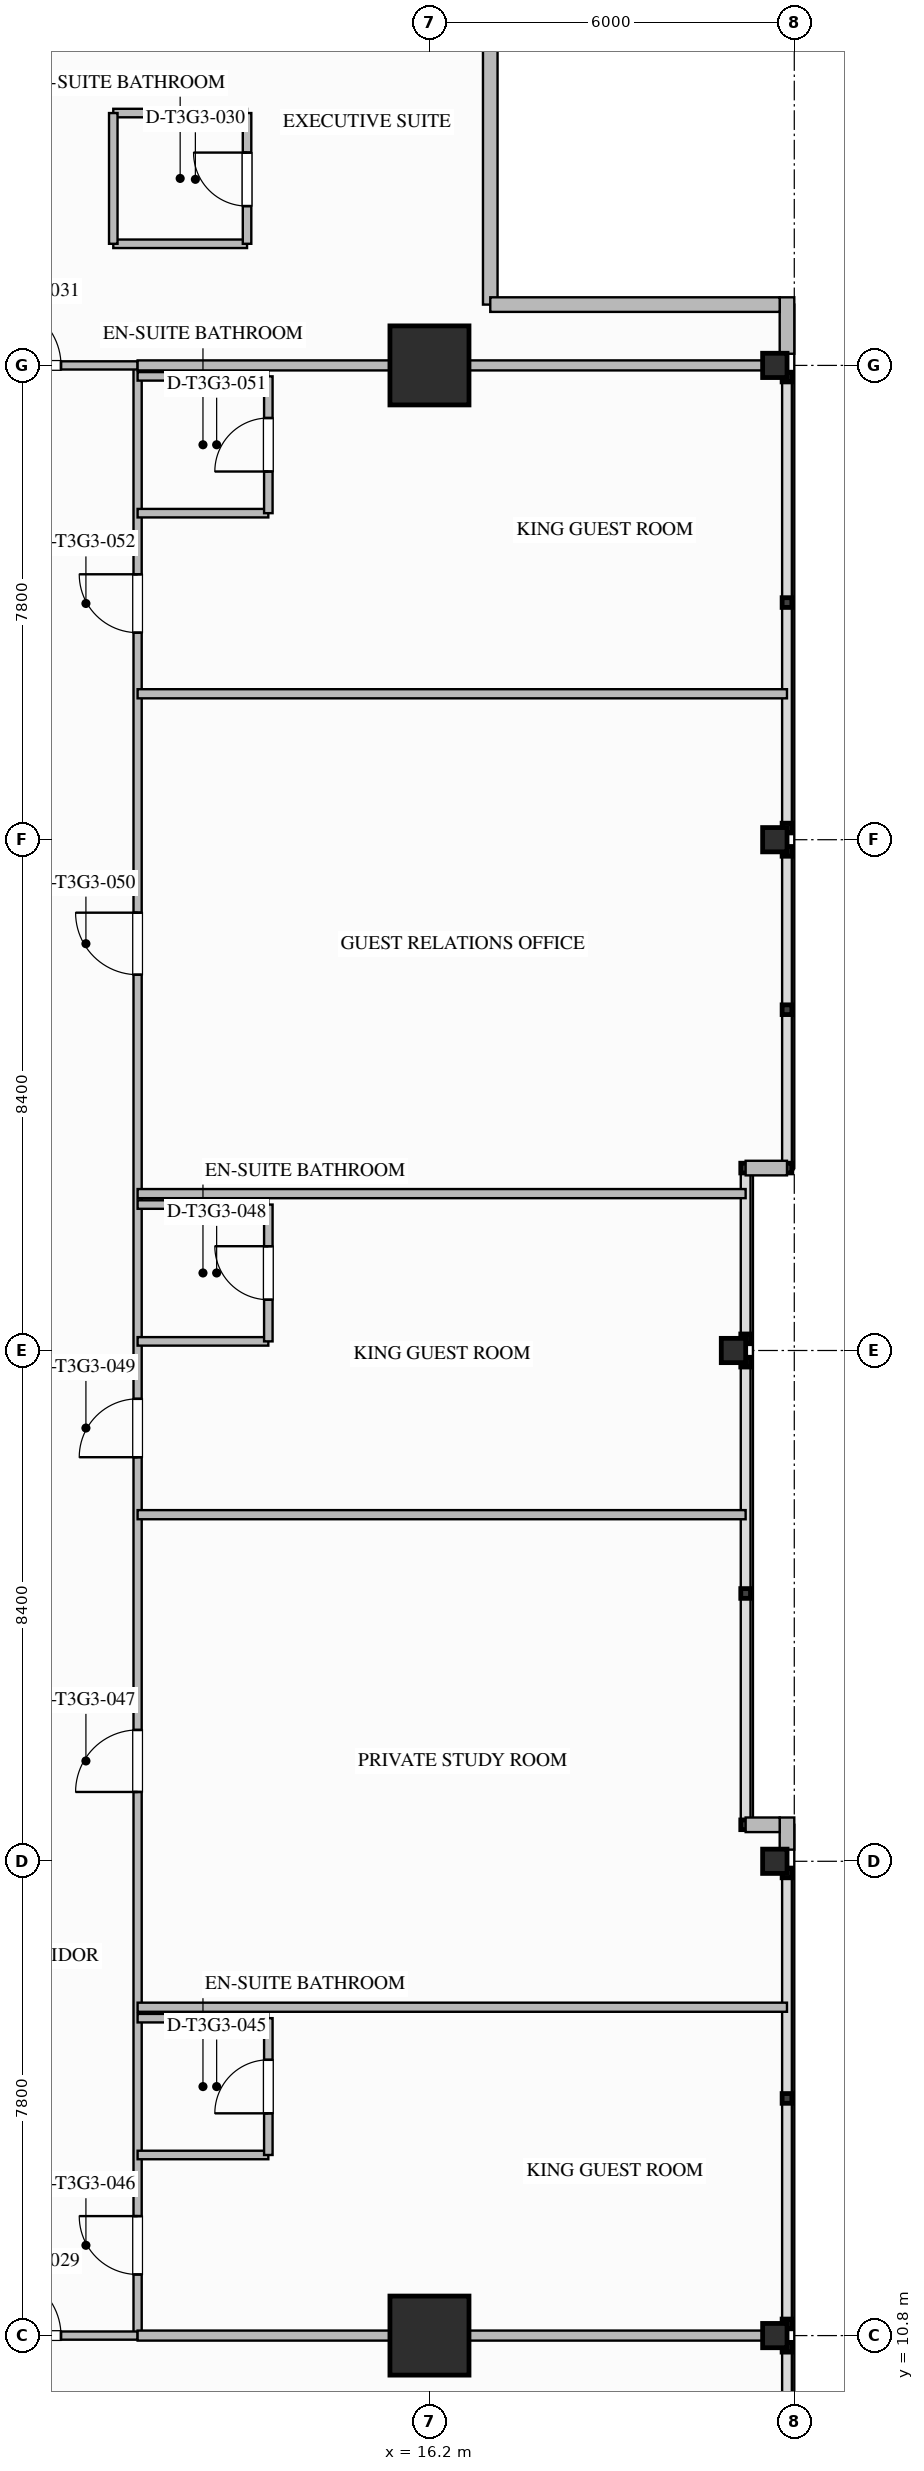
"""IFC4 building model, lengths in metres.
Left out: names, types, materials, properties, quantities, classifications, styles, units other than length and angle.
Written with IfcOpenShell. Run it as: python <this file> out.ifc"""

import sys

from ifc_helpers import new_model, si_unit, direction, frame, frame_2d, origin, origin_2d, place, context, subcontext, project, spatial, rectangle, i_section, extrude, element, fill, save


model = new_model("IFC4")
c1 = context("Model", 3, precision=1e-05, world=origin(), true_north=direction((0.0, 1.0)))
c2 = subcontext(c1, "Body", "Model", "MODEL_VIEW")
j1 = project(units=[si_unit("LENGTHUNIT", "METRE"), si_unit("PLANEANGLEUNIT", "RADIAN")], contexts=[c1])
p1 = place(None, origin())
s1 = spatial("IfcSite", under=j1, at=p1, CompositionType="ELEMENT")
p2 = place(p1, origin())
s2 = spatial("IfcBuilding", under=s1, at=p2, CompositionType="ELEMENT")
p3 = place(p2, frame((0.0, 0.0, 178.8)))
s3 = spatial("IfcBuildingStorey", under=s2, at=p3, CompositionType="ELEMENT", Elevation=178.8)
for number, where, z_axis, x_axis in (
    (1, (16.2, 10.8, 0.0), (0.0, 0.0, 1.0), (1.0, 0.0, 0.0)),
    (2, (16.2, 43.2, 0.0), (0.0, 0.0, 1.0), (1.0, 0.0, 0.0)),
):
    element("IfcColumn", number, at=place(p3, frame(where, z_axis=z_axis, x_axis=x_axis)), inside=s3, PredefinedType="COLUMN", context=c2, shape_type="SweptSolid", body=[
        extrude(rectangle(XDim=1.3, YDim=1.3, at=origin_2d()), origin(), (0.0, 0.0, 1.0), 3.55),
    ])
for number, where, z_axis, x_axis in (
    (3, (21.88, 10.8, 0.0), (0.0, 0.0, 1.0), (1.0, 0.0, 0.0)),
    (4, (21.88, 18.6, 0.0), (0.0, 0.0, 1.0), (1.0, 0.0, 0.0)),
    (5, (21.2, 27.0, 0.0), (0.0, 0.0, 1.0), (1.0, 0.0, 0.0)),
    (6, (21.88, 35.4, 0.0), (0.0, 0.0, 1.0), (1.0, 0.0, 0.0)),
    (7, (21.88, 43.2, 0.0), (0.0, 0.0, 1.0), (1.0, 0.0, 0.0)),
):
    element("IfcColumn", number, at=place(p3, frame(where, z_axis=z_axis, x_axis=x_axis)), inside=s3, PredefinedType="COLUMN", context=c2, shape_type="SweptSolid", body=[
        extrude(i_section(OverallWidth=0.401, OverallDepth=0.399, WebThickness=0.025, FlangeThickness=0.04, FilletRadius=0.025, at=origin_2d()), origin(), (0.0, 0.0, 1.0), 3.547),
    ])
p4 = place(p3, frame((22.08, 44.32, 0.0), z_axis=(0.0, 0.0, 1.0), x_axis=(0.0, -1.0, 0.0)))
e8 = element("IfcWall", 8, at=p4, inside=s3, PredefinedType="STANDARD", context=c2, shape_type="SweptSolid", body=[
    extrude(rectangle(XDim=0.928, YDim=0.24, at=frame_2d((0.464, 0.0))), origin(), (0.0, 0.0, 1.0), 3.29),
])
p5 = place(p3, frame((22.08, 19.32, 0.0), z_axis=(0.0, 0.0, 1.0), x_axis=(0.0, -1.0, 0.0)))
e9 = element("IfcWall", 9, at=p5, inside=s3, PredefinedType="STANDARD", context=c2, shape_type="SweptSolid", body=[
    extrude(rectangle(XDim=0.528, YDim=0.24, at=frame_2d((0.264, 0.0))), origin(), (0.0, 0.0, 1.0), 3.29),
])
for number, where, z_axis, x_axis in (
    (10, (17.2, 48.96, 0.0), (0.0, 0.0, 1.0), (0.0, -1.0, 0.0)),
    (11, (17.2, 44.2, 0.0), (0.0, 0.0, 1.0), (1.0, 0.0, 0.0)),
):
    element("IfcWall", number, at=place(p3, frame(where, z_axis=z_axis, x_axis=x_axis)), inside=s3, PredefinedType="STANDARD", context=c2, shape_type="SweptSolid", body=[
        extrude(rectangle(XDim=4.76, YDim=0.24, at=frame_2d((2.38, 0.0))), origin(), (0.0, 0.0, 1.0), 3.29),
    ])
p6 = place(p3, frame((22.08, 30.0, 0.0), z_axis=(0.0, 0.0, 1.0), x_axis=(-1.0, 0.0, 0.0)))
e12 = element("IfcWall", 12, at=p6, inside=s3, PredefinedType="STANDARD", context=c2, shape_type="SweptSolid", body=[
    extrude(rectangle(XDim=0.68, YDim=0.24, at=frame_2d((0.34, 0.0))), origin(), (0.0, 0.0, 1.0), 3.29),
])
p7 = place(p3, frame((21.4, 19.2, 0.0), z_axis=(0.0, 0.0, 1.0), x_axis=(1.0, 0.0, 0.0)))
e13 = element("IfcWall", 13, at=p7, inside=s3, PredefinedType="STANDARD", context=c2, shape_type="SweptSolid", body=[
    extrude(rectangle(XDim=0.56, YDim=0.24, at=frame_2d((0.28, 0.0))), origin(), (0.0, 0.0, 1.0), 3.29),
])
p8 = place(p3, frame((11.4, 10.8, 0.0), z_axis=(0.0, 0.0, 1.0), x_axis=(0.0, 1.0, 0.0)))
e14 = element("IfcWall", 14, at=p8, inside=s3, PredefinedType="PARTITIONING", context=c2, shape_type="SweptSolid", body=[
    extrude(rectangle(XDim=32.4, YDim=0.135, at=frame_2d((16.2, 0.0))), origin(), (0.0, 0.0, 1.0), 3.29),
])
p9 = place(p8, frame((1.005, 0.0, 0.0)))
e15 = element("IfcOpeningElement", 15, at=p9, cuts=e14, PredefinedType="OPENING", context=c2, shape_type="SweptSolid", body=[
    extrude(rectangle(XDim=0.96, YDim=2.15, at=frame_2d((0.48, 1.075))), frame((0.0, 0.077, 0.0), z_axis=(0.0, -1.0, 0.0), x_axis=(1.0, 0.0, 0.0)), (0.0, 0.0, 1.0), 0.155),
])
p10 = place(p8, frame((8.94, 0.0, 0.0)))
e16 = element("IfcOpeningElement", 16, at=p10, cuts=e14, PredefinedType="OPENING", context=c2, shape_type="SweptSolid", body=[
    extrude(rectangle(XDim=1.02, YDim=2.15, at=frame_2d((0.51, 1.075))), frame((0.0, 0.077, 0.0), z_axis=(0.0, -1.0, 0.0), x_axis=(1.0, 0.0, 0.0)), (0.0, 0.0, 1.0), 0.155),
])
p11 = place(p8, frame((14.445, 0.0, 0.0)))
e17 = element("IfcOpeningElement", 17, at=p11, cuts=e14, PredefinedType="OPENING", context=c2, shape_type="SweptSolid", body=[
    extrude(rectangle(XDim=0.96, YDim=2.15, at=frame_2d((0.48, 1.075))), frame((0.0, 0.077, 0.0), z_axis=(0.0, -1.0, 0.0), x_axis=(1.0, 0.0, 0.0)), (0.0, 0.0, 1.0), 0.155),
])
p12 = place(p8, frame((22.38, 0.0, 0.0)))
e18 = element("IfcOpeningElement", 18, at=p12, cuts=e14, PredefinedType="OPENING", context=c2, shape_type="SweptSolid", body=[
    extrude(rectangle(XDim=1.02, YDim=2.15, at=frame_2d((0.51, 1.075))), frame((0.0, 0.077, 0.0), z_axis=(0.0, -1.0, 0.0), x_axis=(1.0, 0.0, 0.0)), (0.0, 0.0, 1.0), 0.155),
])
p13 = place(p8, frame((28.005, 0.0, 0.0)))
e19 = element("IfcOpeningElement", 19, at=p13, cuts=e14, PredefinedType="OPENING", context=c2, shape_type="SweptSolid", body=[
    extrude(rectangle(XDim=0.96, YDim=2.15, at=frame_2d((0.48, 1.075))), frame((0.0, 0.077, 0.0), z_axis=(0.0, -1.0, 0.0), x_axis=(1.0, 0.0, 0.0)), (0.0, 0.0, 1.0), 0.155),
])
p14 = place(p3, frame((8.6, 10.8, 0.0), z_axis=(0.0, 0.0, 1.0), x_axis=(1.0, 0.0, 0.0)))
e20 = element("IfcWall", 20, at=p14, inside=s3, PredefinedType="PARTITIONING", context=c2, shape_type="SweptSolid", body=[
    extrude(rectangle(XDim=2.8, YDim=0.135, at=frame_2d((1.4, 0.0))), origin(), (0.0, 0.0, 1.0), 2.58),
])
p15 = place(p14, frame((0.52, 0.0, 0.0)))
e21 = element("IfcOpeningElement", 21, at=p15, cuts=e20, PredefinedType="OPENING", context=c2, shape_type="SweptSolid", body=[
    extrude(rectangle(XDim=1.02, YDim=2.15, at=frame_2d((0.51, 1.075))), frame((0.0, 0.077, 0.0), z_axis=(0.0, -1.0, 0.0), x_axis=(1.0, 0.0, 0.0)), (0.0, 0.0, 1.0), 0.155),
])
p16 = place(p3, frame((8.6, 43.2, 0.0), z_axis=(0.0, 0.0, 1.0), x_axis=(1.0, 0.0, 0.0)))
e22 = element("IfcWall", 22, at=p16, inside=s3, PredefinedType="PARTITIONING", context=c2, shape_type="SweptSolid", body=[
    extrude(rectangle(XDim=2.8, YDim=0.135, at=frame_2d((1.4, 0.0))), origin(), (0.0, 0.0, 1.0), 2.58),
])
p17 = place(p16, frame((0.52, 0.0, 0.0)))
e23 = element("IfcOpeningElement", 23, at=p17, cuts=e22, PredefinedType="OPENING", context=c2, shape_type="SweptSolid", body=[
    extrude(rectangle(XDim=1.02, YDim=2.15, at=frame_2d((0.51, 1.075))), frame((0.0, 0.077, 0.0), z_axis=(0.0, -1.0, 0.0), x_axis=(1.0, 0.0, 0.0)), (0.0, 0.0, 1.0), 0.155),
])
for number, where, z_axis, x_axis in (
    (24, (11.4, 10.8, 0.0), (0.0, 0.0, 1.0), (1.0, 0.0, 0.0)),
    (25, (11.4, 43.2, 0.0), (0.0, 0.0, 1.0), (1.0, 0.0, 0.0)),
):
    element("IfcWall", number, at=place(p3, frame(where, z_axis=z_axis, x_axis=x_axis)), inside=s3, PredefinedType="PARTITIONING", context=c2, shape_type="SweptSolid", body=[
        extrude(rectangle(XDim=10.68, YDim=0.165, at=frame_2d((5.34, 0.0))), origin(), (0.0, 0.0, 1.0), 2.58),
    ])
for number, where, z_axis, x_axis in (
    (26, (11.0, 45.2, 0.0), (0.0, 0.0, 1.0), (1.0, 0.0, 0.0)),
    (27, (11.0, 47.35, 0.0), (0.0, 0.0, 1.0), (1.0, 0.0, 0.0)),
):
    element("IfcWall", number, at=place(p3, frame(where, z_axis=z_axis, x_axis=x_axis)), inside=s3, PredefinedType="PLUMBINGWALL", context=c2, shape_type="SweptSolid", body=[
        extrude(rectangle(XDim=2.2, YDim=0.14, at=frame_2d((1.1, 0.0))), origin(), (0.0, 0.0, 1.0), 3.29),
    ])
p18 = place(p3, frame((11.0, 45.2, 0.0), z_axis=(0.0, 0.0, 1.0), x_axis=(0.0, 1.0, 0.0)))
e28 = element("IfcWall", 28, at=p18, inside=s3, PredefinedType="PLUMBINGWALL", context=c2, shape_type="SweptSolid", body=[
    extrude(rectangle(XDim=2.15, YDim=0.14, at=frame_2d((1.075, 0.0))), origin(), (0.0, 0.0, 1.0), 3.29),
])
p19 = place(p3, frame((13.2, 45.2, 0.0), z_axis=(0.0, 0.0, 1.0), x_axis=(0.0, 1.0, 0.0)))
e29 = element("IfcWall", 29, at=p19, inside=s3, PredefinedType="PLUMBINGWALL", context=c2, shape_type="SweptSolid", body=[
    extrude(rectangle(XDim=2.15, YDim=0.14, at=frame_2d((1.075, 0.0))), origin(), (0.0, 0.0, 1.0), 3.29),
])
p20 = place(p19, frame((0.62, 0.0, 0.0)))
e30 = element("IfcOpeningElement", 30, at=p20, cuts=e29, PredefinedType="OPENING", context=c2, shape_type="SweptSolid", body=[
    extrude(rectangle(XDim=0.88, YDim=2.1, at=frame_2d((0.44, 1.05))), frame((0.0, 0.08, 0.0), z_axis=(0.0, -1.0, 0.0), x_axis=(1.0, 0.0, 0.0)), (0.0, 0.0, 1.0), 0.16),
])
for number, where, z_axis, x_axis in (
    (31, (11.4, 13.77, 0.0), (0.0, 0.0, 1.0), (1.0, 0.0, 0.0)),
    (32, (11.4, 16.02, 0.0), (0.0, 0.0, 1.0), (1.0, 0.0, 0.0)),
):
    element("IfcWall", number, at=place(p3, frame(where, z_axis=z_axis, x_axis=x_axis)), inside=s3, PredefinedType="PLUMBINGWALL", context=c2, shape_type="SweptSolid", body=[
        extrude(rectangle(XDim=2.15, YDim=0.14, at=frame_2d((1.075, 0.0))), origin(), (0.0, 0.0, 1.0), 3.29),
    ])
p21 = place(p3, frame((13.55, 13.77, 0.0), z_axis=(0.0, 0.0, 1.0), x_axis=(0.0, 1.0, 0.0)))
e33 = element("IfcWall", 33, at=p21, inside=s3, PredefinedType="PLUMBINGWALL", context=c2, shape_type="SweptSolid", body=[
    extrude(rectangle(XDim=2.25, YDim=0.14, at=frame_2d((1.125, 0.0))), origin(), (0.0, 0.0, 1.0), 3.29),
])
p22 = place(p21, frame((0.685, 0.0, 0.0)))
e34 = element("IfcOpeningElement", 34, at=p22, cuts=e33, PredefinedType="OPENING", context=c2, shape_type="SweptSolid", body=[
    extrude(rectangle(XDim=0.88, YDim=2.1, at=frame_2d((0.44, 1.05))), frame((0.0, 0.08, 0.0), z_axis=(0.0, -1.0, 0.0), x_axis=(1.0, 0.0, 0.0)), (0.0, 0.0, 1.0), 0.16),
])
p23 = place(p3, frame((11.4, 16.2, 0.0), z_axis=(0.0, 0.0, 1.0), x_axis=(1.0, 0.0, 0.0)))
e35 = element("IfcWall", 35, at=p23, inside=s3, PredefinedType="PARTITIONING", context=c2, shape_type="SweptSolid", body=[
    extrude(rectangle(XDim=10.68, YDim=0.15, at=frame_2d((5.34, 0.0))), origin(), (0.0, 0.0, 1.0), 3.29),
])
p24 = place(p3, frame((11.4, 24.3, 0.0), z_axis=(0.0, 0.0, 1.0), x_axis=(1.0, 0.0, 0.0)))
e36 = element("IfcWall", 36, at=p24, inside=s3, PredefinedType="PARTITIONING", context=c2, shape_type="SweptSolid", body=[
    extrude(rectangle(XDim=10.0, YDim=0.15, at=frame_2d((5.0, 0.0))), origin(), (0.0, 0.0, 1.0), 3.29),
])
p25 = place(p3, frame((11.4, 27.15, 0.0), z_axis=(0.0, 0.0, 1.0), x_axis=(1.0, 0.0, 0.0)))
e37 = element("IfcWall", 37, at=p25, inside=s3, PredefinedType="PLUMBINGWALL", context=c2, shape_type="SweptSolid", body=[
    extrude(rectangle(XDim=2.15, YDim=0.14, at=frame_2d((1.075, 0.0))), origin(), (0.0, 0.0, 1.0), 2.667),
])
p26 = place(p3, frame((11.4, 29.4, 0.0), z_axis=(0.0, 0.0, 1.0), x_axis=(1.0, 0.0, 0.0)))
e38 = element("IfcWall", 38, at=p26, inside=s3, PredefinedType="PLUMBINGWALL", context=c2, shape_type="SweptSolid", body=[
    extrude(rectangle(XDim=2.15, YDim=0.14, at=frame_2d((1.075, 0.0))), origin(), (0.0, 0.0, 1.0), 3.29),
])
p27 = place(p3, frame((13.55, 27.15, 0.0), z_axis=(0.0, 0.0, 1.0), x_axis=(0.0, 1.0, 0.0)))
e39 = element("IfcWall", 39, at=p27, inside=s3, PredefinedType="PLUMBINGWALL", context=c2, shape_type="SweptSolid", body=[
    extrude(rectangle(XDim=2.25, YDim=0.14, at=frame_2d((1.125, 0.0))), origin(), (0.0, 0.0, 1.0), 3.29),
])
p28 = place(p27, frame((0.685, 0.0, 0.0)))
e40 = element("IfcOpeningElement", 40, at=p28, cuts=e39, PredefinedType="OPENING", context=c2, shape_type="SweptSolid", body=[
    extrude(rectangle(XDim=0.88, YDim=2.1, at=frame_2d((0.44, 1.05))), frame((0.0, 0.08, 0.0), z_axis=(0.0, -1.0, 0.0), x_axis=(1.0, 0.0, 0.0)), (0.0, 0.0, 1.0), 0.16),
])
p29 = place(p3, frame((11.4, 29.58, 0.0), z_axis=(0.0, 0.0, 1.0), x_axis=(1.0, 0.0, 0.0)))
e41 = element("IfcWall", 41, at=p29, inside=s3, PredefinedType="PARTITIONING", context=c2, shape_type="SweptSolid", body=[
    extrude(rectangle(XDim=10.0, YDim=0.15, at=frame_2d((5.0, 0.0))), origin(), (0.0, 0.0, 1.0), 3.29),
])
p30 = place(p3, frame((11.4, 37.8, 0.0), z_axis=(0.0, 0.0, 1.0), x_axis=(1.0, 0.0, 0.0)))
e42 = element("IfcWall", 42, at=p30, inside=s3, PredefinedType="PARTITIONING", context=c2, shape_type="SweptSolid", body=[
    extrude(rectangle(XDim=10.68, YDim=0.15, at=frame_2d((5.34, 0.0))), origin(), (0.0, 0.0, 1.0), 3.29),
])
p31 = place(p3, frame((11.4, 40.77, 0.0), z_axis=(0.0, 0.0, 1.0), x_axis=(1.0, 0.0, 0.0)))
e43 = element("IfcWall", 43, at=p31, inside=s3, PredefinedType="PLUMBINGWALL", context=c2, shape_type="SweptSolid", body=[
    extrude(rectangle(XDim=2.15, YDim=0.14, at=frame_2d((1.075, 0.0))), origin(), (0.0, 0.0, 1.0), 3.29),
])
p32 = place(p3, frame((11.4, 43.02, 0.0), z_axis=(0.0, 0.0, 1.0), x_axis=(1.0, 0.0, 0.0)))
e44 = element("IfcWall", 44, at=p32, inside=s3, PredefinedType="PLUMBINGWALL", context=c2, shape_type="SweptSolid", body=[
    extrude(rectangle(XDim=2.15, YDim=0.14, at=frame_2d((1.075, 0.0))), origin(), (0.0, 0.0, 1.0), 2.58),
])
p33 = place(p3, frame((13.55, 40.77, 0.0), z_axis=(0.0, 0.0, 1.0), x_axis=(0.0, 1.0, 0.0)))
e45 = element("IfcWall", 45, at=p33, inside=s3, PredefinedType="PLUMBINGWALL", context=c2, shape_type="SweptSolid", body=[
    extrude(rectangle(XDim=2.25, YDim=0.14, at=frame_2d((1.125, 0.0))), origin(), (0.0, 0.0, 1.0), 3.29),
])
p34 = place(p33, frame((0.685, 0.0, 0.0)))
e46 = element("IfcOpeningElement", 46, at=p34, cuts=e45, PredefinedType="OPENING", context=c2, shape_type="SweptSolid", body=[
    extrude(rectangle(XDim=0.88, YDim=2.1, at=frame_2d((0.44, 1.05))), frame((0.0, 0.08, 0.0), z_axis=(0.0, -1.0, 0.0), x_axis=(1.0, 0.0, 0.0)), (0.0, 0.0, 1.0), 0.16),
])
p35 = place(p15, origin())
e47 = element("IfcDoor", 47, at=p35, inside=s3, OperationType="SINGLE_SWING_LEFT", PredefinedType="DOOR", context=c2, shape_type="SweptSolid", body=[
    extrude(rectangle(XDim=1.02, YDim=2.15, at=frame_2d((0.51, 1.075))), frame((0.0, 0.025, 0.0), z_axis=(0.0, -1.0, 0.0), x_axis=(1.0, 0.0, 0.0)), (0.0, 0.0, 1.0), 0.05),
])
fill(e21, e47)
p36 = place(p20, origin())
e48 = element("IfcDoor", 48, at=p36, inside=s3, OperationType="SINGLE_SWING_RIGHT", PredefinedType="DOOR", context=c2, shape_type="SweptSolid", body=[
    extrude(rectangle(XDim=0.88, YDim=2.1, at=frame_2d((0.44, 1.05))), frame((0.0, 0.025, 0.0), z_axis=(0.0, -1.0, 0.0), x_axis=(1.0, 0.0, 0.0)), (0.0, 0.0, 1.0), 0.05),
])
fill(e30, e48)
p37 = place(p17, origin())
e49 = element("IfcDoor", 49, at=p37, inside=s3, OperationType="SINGLE_SWING_LEFT", PredefinedType="DOOR", context=c2, shape_type="SweptSolid", body=[
    extrude(rectangle(XDim=1.02, YDim=2.15, at=frame_2d((0.51, 1.075))), frame((0.0, 0.025, 0.0), z_axis=(0.0, -1.0, 0.0), x_axis=(1.0, 0.0, 0.0)), (0.0, 0.0, 1.0), 0.05),
])
fill(e23, e49)
p38 = place(p22, origin())
e50 = element("IfcDoor", 50, at=p38, inside=s3, OperationType="SINGLE_SWING_LEFT", PredefinedType="DOOR", context=c2, shape_type="SweptSolid", body=[
    extrude(rectangle(XDim=0.88, YDim=2.1, at=frame_2d((0.44, 1.05))), frame((0.0, 0.025, 0.0), z_axis=(0.0, -1.0, 0.0), x_axis=(1.0, 0.0, 0.0)), (0.0, 0.0, 1.0), 0.05),
])
fill(e34, e50)
p39 = place(p9, origin())
e51 = element("IfcDoor", 51, at=p39, inside=s3, OperationType="SINGLE_SWING_RIGHT", PredefinedType="DOOR", context=c2, shape_type="SweptSolid", body=[
    extrude(rectangle(XDim=0.96, YDim=2.15, at=frame_2d((0.48, 1.075))), frame((0.0, 0.025, 0.0), z_axis=(0.0, -1.0, 0.0), x_axis=(1.0, 0.0, 0.0)), (0.0, 0.0, 1.0), 0.05),
])
fill(e15, e51)
p40 = place(p10, origin())
e52 = element("IfcDoor", 52, at=p40, inside=s3, OperationType="SINGLE_SWING_LEFT", PredefinedType="DOOR", context=c2, shape_type="SweptSolid", body=[
    extrude(rectangle(XDim=1.02, YDim=2.15, at=frame_2d((0.51, 1.075))), frame((0.0, 0.025, 0.0), z_axis=(0.0, -1.0, 0.0), x_axis=(1.0, 0.0, 0.0)), (0.0, 0.0, 1.0), 0.05),
])
fill(e16, e52)
p41 = place(p28, origin())
e53 = element("IfcDoor", 53, at=p41, inside=s3, OperationType="SINGLE_SWING_RIGHT", PredefinedType="DOOR", context=c2, shape_type="SweptSolid", body=[
    extrude(rectangle(XDim=0.88, YDim=2.1, at=frame_2d((0.44, 1.05))), frame((0.0, 0.025, 0.0), z_axis=(0.0, -1.0, 0.0), x_axis=(1.0, 0.0, 0.0)), (0.0, 0.0, 1.0), 0.05),
])
fill(e40, e53)
p42 = place(p11, origin())
e54 = element("IfcDoor", 54, at=p42, inside=s3, OperationType="SINGLE_SWING_LEFT", PredefinedType="DOOR", context=c2, shape_type="SweptSolid", body=[
    extrude(rectangle(XDim=0.96, YDim=2.15, at=frame_2d((0.48, 1.075))), frame((0.0, 0.025, 0.0), z_axis=(0.0, -1.0, 0.0), x_axis=(1.0, 0.0, 0.0)), (0.0, 0.0, 1.0), 0.05),
])
fill(e17, e54)
p43 = place(p12, origin())
e55 = element("IfcDoor", 55, at=p43, inside=s3, OperationType="SINGLE_SWING_RIGHT", PredefinedType="DOOR", context=c2, shape_type="SweptSolid", body=[
    extrude(rectangle(XDim=1.02, YDim=2.15, at=frame_2d((0.51, 1.075))), frame((0.0, 0.025, 0.0), z_axis=(0.0, -1.0, 0.0), x_axis=(1.0, 0.0, 0.0)), (0.0, 0.0, 1.0), 0.05),
])
fill(e18, e55)
p44 = place(p34, origin())
e56 = element("IfcDoor", 56, at=p44, inside=s3, OperationType="SINGLE_SWING_LEFT", PredefinedType="DOOR", context=c2, shape_type="SweptSolid", body=[
    extrude(rectangle(XDim=0.88, YDim=2.1, at=frame_2d((0.44, 1.05))), frame((0.0, 0.025, 0.0), z_axis=(0.0, -1.0, 0.0), x_axis=(1.0, 0.0, 0.0)), (0.0, 0.0, 1.0), 0.05),
])
fill(e46, e56)
p45 = place(p13, origin())
e57 = element("IfcDoor", 57, at=p45, inside=s3, OperationType="SINGLE_SWING_RIGHT", PredefinedType="DOOR", context=c2, shape_type="SweptSolid", body=[
    extrude(rectangle(XDim=0.96, YDim=2.15, at=frame_2d((0.48, 1.075))), frame((0.0, 0.025, 0.0), z_axis=(0.0, -1.0, 0.0), x_axis=(1.0, 0.0, 0.0)), (0.0, 0.0, 1.0), 0.05),
])
fill(e19, e57)
save(model, sys.argv[1])
